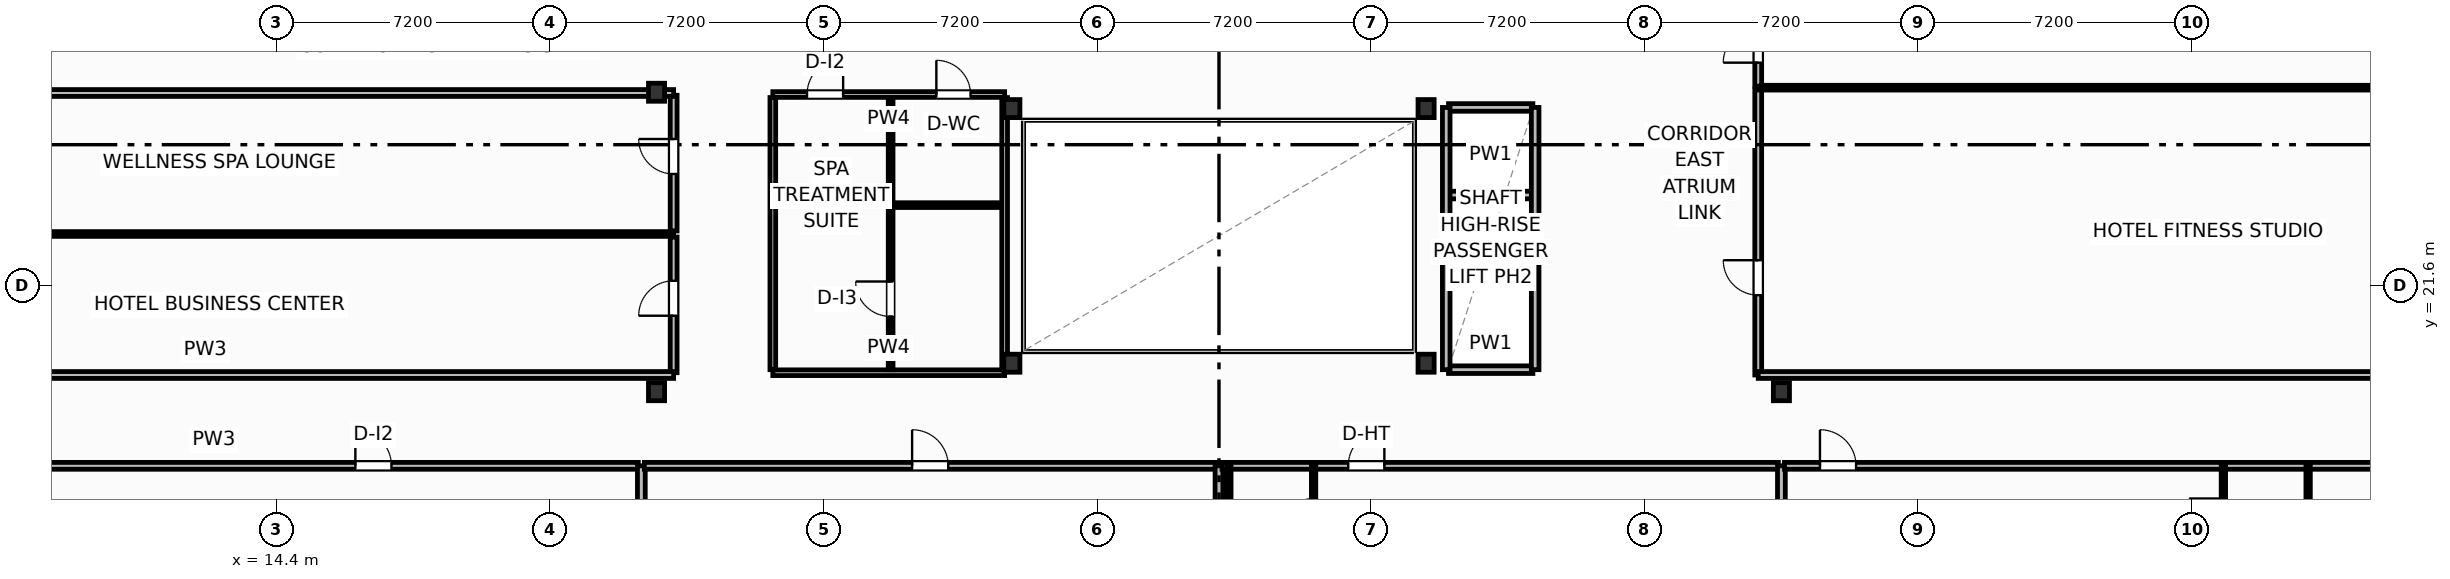
"""IFC4 building model, lengths in metres.
Left out: names, types, materials, properties, quantities, classifications, styles, units other than length and angle.
Written with IfcOpenShell. Run it as: python <this file> out.ifc"""

import sys

from ifc_helpers import new_model, si_unit, direction, frame, frame_2d, origin, origin_2d, place, context, subcontext, project, spatial, rectangle, i_section, extrude, element, fill, save


model = new_model("IFC4")
c1 = context("Model", 3, precision=1e-05, world=origin(), true_north=direction((0.0, 1.0)))
c2 = subcontext(c1, "Body", "Model", "MODEL_VIEW")
j1 = project(units=[si_unit("LENGTHUNIT", "METRE"), si_unit("PLANEANGLEUNIT", "RADIAN")], contexts=[c1])
p1 = place(None, origin())
s1 = spatial("IfcSite", under=j1, at=p1, CompositionType="ELEMENT")
p2 = place(p1, origin())
s2 = spatial("IfcBuilding", under=s1, at=p2, CompositionType="ELEMENT")
p3 = place(p2, frame((0.0, 0.0, 102.1)))
s3 = spatial("IfcBuildingStorey", under=s2, at=p3, CompositionType="ELEMENT", Elevation=102.1)
for number, where, z_axis, x_axis in (
    (1, (33.75, 19.55, 0.0), (0.0, 0.0, 1.0), (1.0, 0.0, 0.0)),
    (2, (44.65, 19.55, 0.0), (0.0, 0.0, 1.0), (1.0, 0.0, 0.0)),
    (3, (33.75, 26.25, 0.0), (0.0, 0.0, 1.0), (1.0, 0.0, 0.0)),
    (4, (44.65, 26.25, 0.0), (0.0, 0.0, 1.0), (1.0, 0.0, 0.0)),
    (5, (24.4, 18.8, 0.0), (0.0, 0.0, 1.0), (1.0, 0.0, 0.0)),
    (6, (24.4, 26.68, 0.0), (0.0, 0.0, 1.0), (1.0, 0.0, 0.0)),
    (7, (54.0, 18.8, 0.0), (0.0, 0.0, 1.0), (1.0, 0.0, 0.0)),
):
    element("IfcColumn", number, at=place(p3, frame(where, z_axis=z_axis, x_axis=x_axis)), inside=s3, PredefinedType="COLUMN", context=c2, shape_type="SweptSolid", body=[
        extrude(i_section(OverallWidth=0.424, OverallDepth=0.474, WebThickness=0.048, FlangeThickness=0.077, FilletRadius=0.025, at=origin_2d()), origin(), (0.0, 0.0, 1.0), 3.7),
    ])
p4 = place(p3, frame((1.58, 16.85, 0.0), z_axis=(0.0, 0.0, 1.0), x_axis=(1.0, 0.0, 0.0)))
e8 = element("IfcWall", 8, at=p4, inside=s3, PredefinedType="PARTITIONING", context=c2, shape_type="SweptSolid", body=[
    extrude(rectangle(XDim=22.34, YDim=0.18, at=frame_2d((11.17, 0.0))), origin(), (0.0, 0.0, 1.0), 3.45),
])
p5 = place(p4, frame((14.895, 0.0, 0.0)))
e9 = element("IfcOpeningElement", 9, at=p5, cuts=e8, PredefinedType="OPENING", context=c2, shape_type="SweptSolid", body=[
    extrude(rectangle(XDim=0.95, YDim=2.05, at=frame_2d((0.475, 1.025))), frame((0.0, 0.1, 0.0), z_axis=(0.0, -1.0, 0.0), x_axis=(1.0, 0.0, 0.0)), (0.0, 0.0, 1.0), 0.2),
])
p6 = place(p3, frame((24.0, 6.076, 0.0), z_axis=(0.0, 0.0, 1.0), x_axis=(0.0, 1.0, 0.0)))
e10 = element("IfcWall", 10, at=p6, inside=s3, PredefinedType="PARTITIONING", context=c2, shape_type="SweptSolid", body=[
    extrude(rectangle(XDim=10.774, YDim=0.205, at=frame_2d((5.387, 0.0))), origin(), (0.0, 0.0, 1.0), 2.58),
])
p7 = place(p3, frame((24.08, 16.85, 0.0), z_axis=(0.0, 0.0, 1.0), x_axis=(1.0, 0.0, 0.0)))
e11 = element("IfcWall", 11, at=p7, inside=s3, PredefinedType="PARTITIONING", context=c2, shape_type="SweptSolid", body=[
    extrude(rectangle(XDim=15.04, YDim=0.18, at=frame_2d((7.52, 0.0))), origin(), (0.0, 0.0, 1.0), 3.45),
])
p8 = place(p7, frame((7.045, 0.0, 0.0)))
e12 = element("IfcOpeningElement", 12, at=p8, cuts=e11, PredefinedType="OPENING", context=c2, shape_type="SweptSolid", body=[
    extrude(rectangle(XDim=0.95, YDim=2.05, at=frame_2d((0.475, 1.025))), frame((0.0, 0.1, 0.0), z_axis=(0.0, -1.0, 0.0), x_axis=(1.0, 0.0, 0.0)), (0.0, 0.0, 1.0), 0.2),
])
p9 = place(p3, frame((39.2, 0.322, 0.0), z_axis=(0.0, 0.0, 1.0), x_axis=(0.0, 1.0, 0.0)))
e13 = element("IfcWall", 13, at=p9, inside=s3, PredefinedType="PARTITIONING", context=c2, shape_type="SweptSolid", body=[
    extrude(rectangle(XDim=16.528, YDim=0.205, at=frame_2d((8.264, 0.0))), origin(), (0.0, 0.0, 1.0), 3.45),
])
p10 = place(p3, frame((39.28, 16.85, 0.0), z_axis=(0.0, 0.0, 1.0), x_axis=(1.0, 0.0, 0.0)))
e14 = element("IfcWall", 14, at=p10, inside=s3, PredefinedType="PARTITIONING", context=c2, shape_type="SweptSolid", body=[
    extrude(rectangle(XDim=14.64, YDim=0.18, at=frame_2d((7.32, 0.0))), origin(), (0.0, 0.0, 1.0), 3.45),
])
p11 = place(p10, frame((3.322, 0.0, 0.0)))
e15 = element("IfcOpeningElement", 15, at=p11, cuts=e14, PredefinedType="OPENING", context=c2, shape_type="SweptSolid", body=[
    extrude(rectangle(XDim=0.95, YDim=2.15, at=frame_2d((0.475, 1.075))), frame((0.0, 0.1, 0.0), z_axis=(0.0, -1.0, 0.0), x_axis=(1.0, 0.0, 0.0)), (0.0, 0.0, 1.0), 0.2),
])
p12 = place(p3, frame((41.69, 14.33, 0.0), z_axis=(0.0, 0.0, 1.0), x_axis=(0.0, 1.0, 0.0)))
e16 = element("IfcWall", 16, at=p12, inside=s3, PredefinedType="PARTITIONING", context=c2, shape_type="SweptSolid", body=[
    extrude(rectangle(XDim=2.52, YDim=0.115, at=frame_2d((1.26, 0.0))), origin(), (0.0, 0.0, 1.0), 3.45),
])
p13 = place(p12, frame((0.76, 0.0, 0.0)))
e17 = element("IfcOpeningElement", 17, at=p13, cuts=e16, PredefinedType="OPENING", context=c2, shape_type="SweptSolid", body=[
    extrude(rectangle(XDim=0.9, YDim=2.05, at=frame_2d((0.45, 1.025))), frame((0.0, 0.067, 0.0), z_axis=(0.0, -1.0, 0.0), x_axis=(1.0, 0.0, 0.0)), (0.0, 0.0, 1.0), 0.135),
])
p14 = place(p3, frame((39.46, 14.33, 0.0), z_axis=(0.0, 0.0, 1.0), x_axis=(0.0, 1.0, 0.0)))
e18 = element("IfcWall", 18, at=p14, inside=s3, PredefinedType="PARTITIONING", context=c2, shape_type="SweptSolid", body=[
    extrude(rectangle(XDim=2.52, YDim=0.115, at=frame_2d((1.26, 0.0))), origin(), (0.0, 0.0, 1.0), 3.45),
])
p15 = place(p3, frame((54.0, -4.0, 0.0), z_axis=(0.0, 0.0, 1.0), x_axis=(0.0, 1.0, 0.0)))
e19 = element("IfcWall", 19, at=p15, inside=s3, PredefinedType="PARTITIONING", context=c2, shape_type="SweptSolid", body=[
    extrude(rectangle(XDim=20.85, YDim=0.205, at=frame_2d((10.425, 0.0))), origin(), (0.0, 0.0, 1.0), 3.45),
])
p16 = place(p3, frame((54.08, 16.85, 0.0), z_axis=(0.0, 0.0, 1.0), x_axis=(1.0, 0.0, 0.0)))
e20 = element("IfcWall", 20, at=p16, inside=s3, PredefinedType="PARTITIONING", context=c2, shape_type="SweptSolid", body=[
    extrude(rectangle(XDim=21.722, YDim=0.18, at=frame_2d((10.861, 0.0))), origin(), (0.0, 0.0, 1.0), 2.58),
])
p17 = place(p16, frame((0.934, 0.0, 0.0)))
e21 = element("IfcOpeningElement", 21, at=p17, cuts=e20, PredefinedType="OPENING", context=c2, shape_type="SweptSolid", body=[
    extrude(rectangle(XDim=0.95, YDim=2.15, at=frame_2d((0.475, 1.075))), frame((0.0, 0.1, 0.0), z_axis=(0.0, -1.0, 0.0), x_axis=(1.0, 0.0, 0.0)), (0.0, 0.0, 1.0), 0.2),
])
p18 = place(p3, frame((65.63, 14.33, 0.0), z_axis=(0.0, 0.0, 1.0), x_axis=(0.0, 1.0, 0.0)))
e22 = element("IfcWall", 22, at=p18, inside=s3, PredefinedType="PARTITIONING", context=c2, shape_type="SweptSolid", body=[
    extrude(rectangle(XDim=2.52, YDim=0.115, at=frame_2d((1.26, 0.0))), origin(), (0.0, 0.0, 1.0), 3.45),
])
p19 = place(p18, frame((0.76, 0.0, 0.0)))
e23 = element("IfcOpeningElement", 23, at=p19, cuts=e22, PredefinedType="OPENING", context=c2, shape_type="SweptSolid", body=[
    extrude(rectangle(XDim=0.9, YDim=2.05, at=frame_2d((0.45, 1.025))), frame((0.0, 0.067, 0.0), z_axis=(0.0, -1.0, 0.0), x_axis=(1.0, 0.0, 0.0)), (0.0, 0.0, 1.0), 0.135),
])
p20 = place(p3, frame((67.86, 14.33, 0.0), z_axis=(0.0, 0.0, 1.0), x_axis=(0.0, 1.0, 0.0)))
e24 = element("IfcWall", 24, at=p20, inside=s3, PredefinedType="PARTITIONING", context=c2, shape_type="SweptSolid", body=[
    extrude(rectangle(XDim=2.52, YDim=0.115, at=frame_2d((1.26, 0.0))), origin(), (0.0, 0.0, 1.0), 3.45),
])
p21 = place(p3, frame((24.85, 19.3, 0.0), z_axis=(0.0, 0.0, 1.0), x_axis=(0.0, 1.0, 0.0)))
e25 = element("IfcWall", 25, at=p21, inside=s3, PredefinedType="PARTITIONING", context=c2, shape_type="SweptSolid", body=[
    extrude(rectangle(XDim=3.57, YDim=0.18, at=frame_2d((1.785, 0.0))), origin(), (0.0, 0.0, 1.0), 3.45),
])
p22 = place(p21, frame((1.5, 0.0, 0.0)))
e26 = element("IfcOpeningElement", 26, at=p22, cuts=e25, PredefinedType="OPENING", context=c2, shape_type="SweptSolid", body=[
    extrude(rectangle(XDim=0.92, YDim=2.05, at=frame_2d((0.46, 1.025))), frame((0.0, 0.1, 0.0), z_axis=(0.0, -1.0, 0.0), x_axis=(1.0, 0.0, 0.0)), (0.0, 0.0, 1.0), 0.2),
])
p23 = place(p3, frame((24.85, 23.03, 0.0), z_axis=(0.0, 0.0, 1.0), x_axis=(0.0, 1.0, 0.0)))
e27 = element("IfcWall", 27, at=p23, inside=s3, PredefinedType="PARTITIONING", context=c2, shape_type="SweptSolid", body=[
    extrude(rectangle(XDim=3.57, YDim=0.18, at=frame_2d((1.785, 0.0))), origin(), (0.0, 0.0, 1.0), 3.45),
])
p24 = place(p23, frame((1.5, 0.0, 0.0)))
e28 = element("IfcOpeningElement", 28, at=p24, cuts=e27, PredefinedType="OPENING", context=c2, shape_type="SweptSolid", body=[
    extrude(rectangle(XDim=0.92, YDim=2.05, at=frame_2d((0.46, 1.025))), frame((0.0, 0.1, 0.0), z_axis=(0.0, -1.0, 0.0), x_axis=(1.0, 0.0, 0.0)), (0.0, 0.0, 1.0), 0.2),
])
p25 = place(p3, frame((1.0, 22.95, 0.0), z_axis=(0.0, 0.0, 1.0), x_axis=(1.0, 0.0, 0.0)))
e29 = element("IfcWall", 29, at=p25, inside=s3, PredefinedType="PARTITIONING", context=c2, shape_type="SweptSolid", body=[
    extrude(rectangle(XDim=23.85, YDim=0.125, at=frame_2d((11.925, 0.0))), origin(), (0.0, 0.0, 1.0), 3.45),
])
p26 = place(p3, frame((0.2, 19.24, 0.0), z_axis=(0.0, 0.0, 1.0), x_axis=(1.0, 0.0, 0.0)))
e30 = element("IfcWall", 30, at=p26, inside=s3, PredefinedType="PARTITIONING", context=c2, shape_type="SweptSolid", body=[
    extrude(rectangle(XDim=24.65, YDim=0.18, at=frame_2d((12.325, 0.0))), origin(), (0.0, 0.0, 1.0), 3.45),
])
p27 = place(p3, frame((-0.086, 26.66, 0.0), z_axis=(0.0, 0.0, 1.0), x_axis=(1.0, 0.0, 0.0)))
e31 = element("IfcWall", 31, at=p27, inside=s3, PredefinedType="PARTITIONING", context=c2, shape_type="SweptSolid", body=[
    extrude(rectangle(XDim=24.936, YDim=0.18, at=frame_2d((12.468, 0.0))), origin(), (0.0, 0.0, 1.0), 2.662),
])
p28 = place(p3, frame((53.39, 19.24, 0.0), z_axis=(0.0, 0.0, 1.0), x_axis=(0.0, 1.0, 0.0)))
e32 = element("IfcWall", 32, at=p28, inside=s3, PredefinedType="PARTITIONING", context=c2, shape_type="SweptSolid", body=[
    extrude(rectangle(XDim=7.52, YDim=0.18, at=frame_2d((3.76, 0.0))), origin(), (0.0, 0.0, 1.0), 3.45),
])
p29 = place(p28, frame((2.1, 0.0, 0.0)))
e33 = element("IfcOpeningElement", 33, at=p29, cuts=e32, PredefinedType="OPENING", context=c2, shape_type="SweptSolid", body=[
    extrude(rectangle(XDim=0.92, YDim=2.05, at=frame_2d((0.46, 1.025))), frame((0.0, 0.1, 0.0), z_axis=(0.0, -1.0, 0.0), x_axis=(1.0, 0.0, 0.0)), (0.0, 0.0, 1.0), 0.2),
])
p30 = place(p3, frame((53.39, 26.8, 0.0), z_axis=(0.0, 0.0, 1.0), x_axis=(1.0, 0.0, 0.0)))
e34 = element("IfcWall", 34, at=p30, inside=s3, PredefinedType="PARTITIONING", context=c2, shape_type="SweptSolid", body=[
    extrude(rectangle(XDim=23.61, YDim=0.125, at=frame_2d((11.805, 0.0))), origin(), (0.0, 0.0, 1.0), 3.45),
])
p31 = place(p3, frame((53.39, 19.24, 0.0), z_axis=(0.0, 0.0, 1.0), x_axis=(1.0, 0.0, 0.0)))
e35 = element("IfcWall", 35, at=p31, inside=s3, PredefinedType="PARTITIONING", context=c2, shape_type="SweptSolid", body=[
    extrude(rectangle(XDim=23.317, YDim=0.18, at=frame_2d((11.658, 0.0))), origin(), (0.0, 0.0, 1.0), 3.45),
])
p32 = place(p3, frame((53.39, 26.84, 0.0), z_axis=(0.0, 0.0, 1.0), x_axis=(0.0, 1.0, 0.0)))
e36 = element("IfcWall", 36, at=p32, inside=s3, PredefinedType="PARTITIONING", context=c2, shape_type="SweptSolid", body=[
    extrude(rectangle(XDim=12.46, YDim=0.18, at=frame_2d((6.23, 0.0))), origin(), (0.0, 0.0, 1.0), 3.45),
])
p33 = place(p32, frame((0.618, 0.0, 0.0)))
e37 = element("IfcOpeningElement", 37, at=p33, cuts=e36, PredefinedType="OPENING", context=c2, shape_type="SweptSolid", body=[
    extrude(rectangle(XDim=0.92, YDim=2.05, at=frame_2d((0.46, 1.025))), frame((0.0, 0.1, 0.0), z_axis=(0.0, -1.0, 0.0), x_axis=(1.0, 0.0, 0.0)), (0.0, 0.0, 1.0), 0.2),
])
p34 = place(p3, frame((27.46, 26.62, 0.0), z_axis=(0.0, 0.0, 1.0), x_axis=(1.0, 0.0, 0.0)))
e38 = element("IfcWall", 38, at=p34, inside=s3, PredefinedType="PARTITIONING", context=c2, shape_type="SweptSolid", body=[
    extrude(rectangle(XDim=6.1, YDim=0.15, at=frame_2d((3.05, 0.0))), origin(), (0.0, 0.0, 1.0), 2.662),
])
p35 = place(p34, frame((0.9, 0.0, 0.0)))
e39 = element("IfcOpeningElement", 39, at=p35, cuts=e38, PredefinedType="OPENING", context=c2, shape_type="SweptSolid", body=[
    extrude(rectangle(XDim=0.95, YDim=2.05, at=frame_2d((0.475, 1.025))), frame((0.0, 0.085, 0.0), z_axis=(0.0, -1.0, 0.0), x_axis=(1.0, 0.0, 0.0)), (0.0, 0.0, 1.0), 0.17),
])
p36 = place(p34, frame((4.303, 0.0, 0.0)))
e40 = element("IfcOpeningElement", 40, at=p36, cuts=e38, PredefinedType="OPENING", context=c2, shape_type="SweptSolid", body=[
    extrude(rectangle(XDim=0.9, YDim=2.05, at=frame_2d((0.45, 1.025))), frame((0.0, 0.085, 0.0), z_axis=(0.0, -1.0, 0.0), x_axis=(1.0, 0.0, 0.0)), (0.0, 0.0, 1.0), 0.17),
])
p37 = place(p3, frame((27.46, 19.3, 0.0), z_axis=(0.0, 0.0, 1.0), x_axis=(1.0, 0.0, 0.0)))
e41 = element("IfcWall", 41, at=p37, inside=s3, PredefinedType="PARTITIONING", context=c2, shape_type="SweptSolid", body=[
    extrude(rectangle(XDim=6.1, YDim=0.15, at=frame_2d((3.05, 0.0))), origin(), (0.0, 0.0, 1.0), 2.662),
])
p38 = place(p3, frame((30.56, 19.38, 0.0), z_axis=(0.0, 0.0, 1.0), x_axis=(0.0, 1.0, 0.0)))
e42 = element("IfcWall", 42, at=p38, inside=s3, PredefinedType="PARTITIONING", context=c2, shape_type="SweptSolid", body=[
    extrude(rectangle(XDim=7.16, YDim=0.125, at=frame_2d((3.58, 0.0))), origin(), (0.0, 0.0, 1.0), 3.45),
])
p39 = place(p38, frame((1.4, 0.0, 0.0)))
e43 = element("IfcOpeningElement", 43, at=p39, cuts=e42, PredefinedType="OPENING", context=c2, shape_type="SweptSolid", body=[
    extrude(rectangle(XDim=0.92, YDim=2.05, at=frame_2d((0.46, 1.025))), frame((0.0, 0.073, 0.0), z_axis=(0.0, -1.0, 0.0), x_axis=(1.0, 0.0, 0.0)), (0.0, 0.0, 1.0), 0.145),
])
p40 = place(p3, frame((30.64, 23.71, 0.0), z_axis=(0.0, 0.0, 1.0), x_axis=(1.0, 0.0, 0.0)))
e44 = element("IfcWall", 44, at=p40, inside=s3, PredefinedType="PARTITIONING", context=c2, shape_type="SweptSolid", body=[
    extrude(rectangle(XDim=2.88, YDim=0.125, at=frame_2d((1.44, 0.0))), origin(), (0.0, 0.0, 1.0), 3.45),
])
p41 = place(p3, frame((27.46, 19.38, 0.0), z_axis=(0.0, 0.0, 1.0), x_axis=(0.0, 1.0, 0.0)))
e45 = element("IfcWall", 45, at=p41, inside=s3, PredefinedType="PARTITIONING", context=c2, shape_type="SweptSolid", body=[
    extrude(rectangle(XDim=7.16, YDim=0.15, at=frame_2d((3.58, 0.0))), origin(), (0.0, 0.0, 1.0), 3.45),
])
p42 = place(p3, frame((33.56, 19.38, 0.0), z_axis=(0.0, 0.0, 1.0), x_axis=(0.0, 1.0, 0.0)))
e46 = element("IfcWall", 46, at=p42, inside=s3, PredefinedType="PARTITIONING", context=c2, shape_type="SweptSolid", body=[
    extrude(rectangle(XDim=7.16, YDim=0.15, at=frame_2d((3.58, 0.0))), origin(), (0.0, 0.0, 1.0), 2.824),
])
for number, where, z_axis, x_axis in (
    (47, (45.24, 21.675, 0.0), (0.0, 0.0, 1.0), (1.0, 0.0, 0.0)),
    (48, (45.24, 23.975, 0.0), (0.0, 0.0, 1.0), (1.0, 0.0, 0.0)),
):
    element("IfcWall", number, at=place(p3, frame(where, z_axis=z_axis, x_axis=x_axis)), inside=s3, PredefinedType="PARTITIONING", context=c2, shape_type="SweptSolid", body=[
        extrude(rectangle(XDim=2.22, YDim=0.2, at=frame_2d((1.11, 0.0))), origin(), (0.0, 0.0, 1.0), 3.45),
    ])
p43 = place(p3, frame((45.24, 19.38, 0.0), z_axis=(0.0, 0.0, 1.0), x_axis=(1.0, 0.0, 0.0)))
e49 = element("IfcWall", 49, at=p43, inside=s3, PredefinedType="PARTITIONING", context=c2, shape_type="SweptSolid", body=[
    extrude(rectangle(XDim=2.22, YDim=0.2, at=frame_2d((1.11, 0.0))), origin(), (0.0, 0.0, 1.0), 2.662),
])
p44 = place(p3, frame((45.24, 26.28, 0.0), z_axis=(0.0, 0.0, 1.0), x_axis=(1.0, 0.0, 0.0)))
e50 = element("IfcWall", 50, at=p44, inside=s3, PredefinedType="PARTITIONING", context=c2, shape_type="SweptSolid", body=[
    extrude(rectangle(XDim=2.22, YDim=0.2, at=frame_2d((1.11, 0.0))), origin(), (0.0, 0.0, 1.0), 3.45),
])
for number, where, z_axis, x_axis in (
    (51, (45.18, 19.38, 0.0), (0.0, 0.0, 1.0), (0.0, 1.0, 0.0)),
    (52, (47.52, 19.38, 0.0), (0.0, 0.0, 1.0), (0.0, 1.0, 0.0)),
):
    element("IfcWall", number, at=place(p3, frame(where, z_axis=z_axis, x_axis=x_axis)), inside=s3, PredefinedType="PARTITIONING", context=c2, shape_type="SweptSolid", body=[
        extrude(rectangle(XDim=6.9, YDim=0.2, at=frame_2d((3.45, 0.0))), origin(), (0.0, 0.0, 1.0), 3.45),
    ])
p45 = place(p5, origin())
e53 = element("IfcDoor", 53, at=p45, inside=s3, OperationType="SINGLE_SWING_LEFT", PredefinedType="DOOR", context=c2, shape_type="SweptSolid", body=[
    extrude(rectangle(XDim=0.95, YDim=2.05, at=frame_2d((0.475, 1.025))), frame((0.0, 0.025, 0.0), z_axis=(0.0, -1.0, 0.0), x_axis=(1.0, 0.0, 0.0)), (0.0, 0.0, 1.0), 0.05),
])
fill(e9, e53)
p46 = place(p8, origin())
e54 = element("IfcDoor", 54, at=p46, inside=s3, OperationType="SINGLE_SWING_LEFT", PredefinedType="DOOR", context=c2, shape_type="SweptSolid", body=[
    extrude(rectangle(XDim=0.95, YDim=2.05, at=frame_2d((0.475, 1.025))), frame((0.0, 0.025, 0.0), z_axis=(0.0, -1.0, 0.0), x_axis=(1.0, 0.0, 0.0)), (0.0, 0.0, 1.0), 0.05),
])
fill(e12, e54)
p47 = place(p11, origin())
e55 = element("IfcDoor", 55, at=p47, inside=s3, OperationType="SINGLE_SWING_RIGHT", PredefinedType="DOOR", context=c2, shape_type="SweptSolid", body=[
    extrude(rectangle(XDim=0.95, YDim=2.15, at=frame_2d((0.475, 1.075))), frame((0.0, 0.025, 0.0), z_axis=(0.0, -1.0, 0.0), x_axis=(1.0, 0.0, 0.0)), (0.0, 0.0, 1.0), 0.05),
])
fill(e15, e55)
p48 = place(p13, origin())
e56 = element("IfcDoor", 56, at=p48, inside=s3, OperationType="SINGLE_SWING_LEFT", PredefinedType="DOOR", context=c2, shape_type="SweptSolid", body=[
    extrude(rectangle(XDim=0.9, YDim=2.05, at=frame_2d((0.45, 1.025))), frame((0.0, 0.025, 0.0), z_axis=(0.0, -1.0, 0.0), x_axis=(1.0, 0.0, 0.0)), (0.0, 0.0, 1.0), 0.05),
])
fill(e17, e56)
p49 = place(p17, origin())
e57 = element("IfcDoor", 57, at=p49, inside=s3, OperationType="SINGLE_SWING_LEFT", PredefinedType="DOOR", context=c2, shape_type="SweptSolid", body=[
    extrude(rectangle(XDim=0.95, YDim=2.15, at=frame_2d((0.475, 1.075))), frame((0.0, 0.025, 0.0), z_axis=(0.0, -1.0, 0.0), x_axis=(1.0, 0.0, 0.0)), (0.0, 0.0, 1.0), 0.05),
])
fill(e21, e57)
p50 = place(p19, origin())
e58 = element("IfcDoor", 58, at=p50, inside=s3, OperationType="SINGLE_SWING_RIGHT", PredefinedType="DOOR", context=c2, shape_type="SweptSolid", body=[
    extrude(rectangle(XDim=0.9, YDim=2.05, at=frame_2d((0.45, 1.025))), frame((0.0, 0.025, 0.0), z_axis=(0.0, -1.0, 0.0), x_axis=(1.0, 0.0, 0.0)), (0.0, 0.0, 1.0), 0.05),
])
fill(e23, e58)
p51 = place(p22, origin())
e59 = element("IfcDoor", 59, at=p51, inside=s3, OperationType="SINGLE_SWING_LEFT", PredefinedType="DOOR", context=c2, shape_type="SweptSolid", body=[
    extrude(rectangle(XDim=0.92, YDim=2.05, at=frame_2d((0.46, 1.025))), frame((0.0, 0.025, 0.0), z_axis=(0.0, -1.0, 0.0), x_axis=(1.0, 0.0, 0.0)), (0.0, 0.0, 1.0), 0.05),
])
fill(e26, e59)
p52 = place(p24, origin())
e60 = element("IfcDoor", 60, at=p52, inside=s3, OperationType="SINGLE_SWING_RIGHT", PredefinedType="DOOR", context=c2, shape_type="SweptSolid", body=[
    extrude(rectangle(XDim=0.92, YDim=2.05, at=frame_2d((0.46, 1.025))), frame((0.0, 0.025, 0.0), z_axis=(0.0, -1.0, 0.0), x_axis=(1.0, 0.0, 0.0)), (0.0, 0.0, 1.0), 0.05),
])
fill(e28, e60)
p53 = place(p29, origin())
e61 = element("IfcDoor", 61, at=p53, inside=s3, OperationType="SINGLE_SWING_RIGHT", PredefinedType="DOOR", context=c2, shape_type="SweptSolid", body=[
    extrude(rectangle(XDim=0.92, YDim=2.05, at=frame_2d((0.46, 1.025))), frame((0.0, 0.025, 0.0), z_axis=(0.0, -1.0, 0.0), x_axis=(1.0, 0.0, 0.0)), (0.0, 0.0, 1.0), 0.05),
])
fill(e33, e61)
p54 = place(p33, origin())
e62 = element("IfcDoor", 62, at=p54, inside=s3, OperationType="SINGLE_SWING_LEFT", PredefinedType="DOOR", context=c2, shape_type="SweptSolid", body=[
    extrude(rectangle(XDim=0.92, YDim=2.05, at=frame_2d((0.46, 1.025))), frame((0.0, 0.025, 0.0), z_axis=(0.0, -1.0, 0.0), x_axis=(1.0, 0.0, 0.0)), (0.0, 0.0, 1.0), 0.05),
])
fill(e37, e62)
p55 = place(p35, origin())
e63 = element("IfcDoor", 63, at=p55, inside=s3, OperationType="SINGLE_SWING_RIGHT", PredefinedType="DOOR", context=c2, shape_type="SweptSolid", body=[
    extrude(rectangle(XDim=0.95, YDim=2.05, at=frame_2d((0.475, 1.025))), frame((0.0, 0.025, 0.0), z_axis=(0.0, -1.0, 0.0), x_axis=(1.0, 0.0, 0.0)), (0.0, 0.0, 1.0), 0.05),
])
fill(e39, e63)
p56 = place(p36, origin())
e64 = element("IfcDoor", 64, at=p56, inside=s3, OperationType="SINGLE_SWING_LEFT", PredefinedType="DOOR", context=c2, shape_type="SweptSolid", body=[
    extrude(rectangle(XDim=0.9, YDim=2.05, at=frame_2d((0.45, 1.025))), frame((0.0, 0.025, 0.0), z_axis=(0.0, -1.0, 0.0), x_axis=(1.0, 0.0, 0.0)), (0.0, 0.0, 1.0), 0.05),
])
fill(e40, e64)
p57 = place(p39, origin())
e65 = element("IfcDoor", 65, at=p57, inside=s3, OperationType="SINGLE_SWING_RIGHT", PredefinedType="DOOR", context=c2, shape_type="SweptSolid", body=[
    extrude(rectangle(XDim=0.92, YDim=2.05, at=frame_2d((0.46, 1.025))), frame((0.0, 0.025, 0.0), z_axis=(0.0, -1.0, 0.0), x_axis=(1.0, 0.0, 0.0)), (0.0, 0.0, 1.0), 0.05),
])
fill(e43, e65)
save(model, sys.argv[1])
